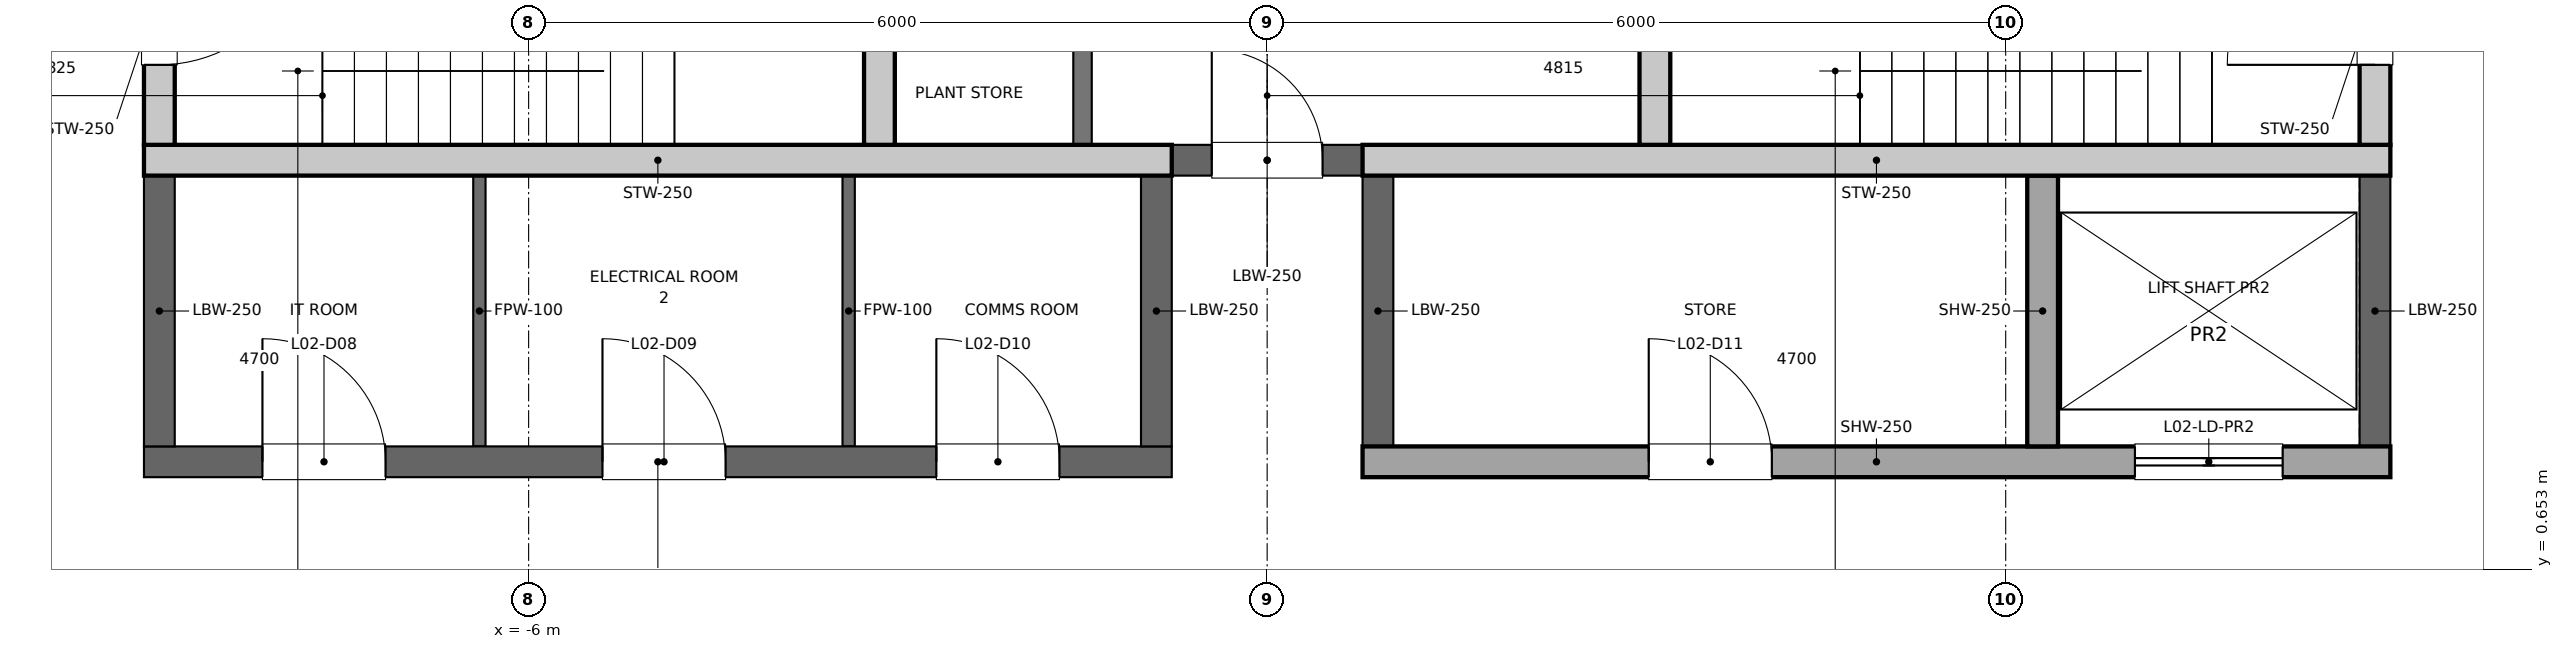
"""IFC4 building model, lengths in metres.
Left out: names, types, materials, properties, quantities, classifications, styles, units other than length and angle.
Written with IfcOpenShell. Run it as: python <this file> out.ifc"""

import sys

from ifc_helpers import new_model, si_unit, direction, frame, frame_2d, origin, place, context, subcontext, project, spatial, rectangle, extrude, element, fill, save


model = new_model("IFC4")
c1 = context("Model", 3, precision=1e-05, world=origin(), true_north=direction((0.0, 1.0)))
c2 = subcontext(c1, "Body", "Model", "MODEL_VIEW")
j1 = project(units=[si_unit("LENGTHUNIT", "METRE"), si_unit("PLANEANGLEUNIT", "RADIAN")], contexts=[c1])
p1 = place(None, origin())
s1 = spatial("IfcSite", under=j1, at=p1, CompositionType="ELEMENT")
p2 = place(p1, origin())
s2 = spatial("IfcBuilding", under=s1, at=p2, CompositionType="ELEMENT")
p3 = place(p2, frame((0.0, 0.0, 17.0)))
s3 = spatial("IfcBuildingStorey", under=s2, at=p3, CompositionType="ELEMENT", Elevation=17.0)
p4 = place(p3, frame((-1.5, 4.1, 0.0), z_axis=(0.0, 0.0, 1.0), x_axis=(0.0, 1.0, 0.0)))
e1 = element("IfcWall", 1, at=p4, inside=s3, PredefinedType="PARTITIONING", context=c2, shape_type="SweptSolid", body=[
    extrude(rectangle(XDim=2.5, YDim=0.15, at=frame_2d((1.25, 0.0))), origin(), (0.0, 0.0, 1.0), 8.8),
])
p5 = place(p4, frame((0.8, 0.0, 0.0)))
e2 = element("IfcOpeningElement", 2, at=p5, cuts=e1, PredefinedType="OPENING", context=c2, shape_type="SweptSolid", body=[
    extrude(rectangle(XDim=0.9, YDim=2.1, at=frame_2d((0.45, 1.05))), frame((0.0, 0.075, 0.0), z_axis=(0.0, -1.0, 0.0), x_axis=(1.0, 0.0, 0.0)), (0.0, 0.0, 1.0), 0.15),
])
p6 = place(p3, frame((-9.0, 4.1, 0.0), z_axis=(0.0, 0.0, 1.0), x_axis=(0.0, 1.0, 0.0)))
e3 = element("IfcWall", 3, at=p6, inside=s3, PredefinedType="SOLIDWALL", context=c2, shape_type="SweptSolid", body=[
    extrude(rectangle(XDim=2.5, YDim=0.25, at=frame_2d((1.25, 0.0))), origin(), (0.0, 0.0, 1.0), 8.8),
])
p7 = place(p6, frame((0.65, 0.0, 0.0)))
e4 = element("IfcOpeningElement", 4, at=p7, cuts=e3, PredefinedType="OPENING", context=c2, shape_type="SweptSolid", body=[
    extrude(rectangle(XDim=1.2, YDim=2.1, at=frame_2d((0.6, 1.05))), frame((0.0, 0.125, 0.0), z_axis=(0.0, -1.0, 0.0), x_axis=(1.0, 0.0, 0.0)), (0.0, 0.0, 1.0), 0.25),
])
p8 = place(p3, frame((9.0, 4.1, 0.0), z_axis=(0.0, 0.0, 1.0), x_axis=(0.0, 1.0, 0.0)))
e5 = element("IfcWall", 5, at=p8, inside=s3, PredefinedType="SOLIDWALL", context=c2, shape_type="SweptSolid", body=[
    extrude(rectangle(XDim=2.5, YDim=0.25, at=frame_2d((1.25, 0.0))), origin(), (0.0, 0.0, 1.0), 8.8),
])
p9 = place(p8, frame((0.65, 0.0, 0.0)))
e6 = element("IfcOpeningElement", 6, at=p9, cuts=e5, PredefinedType="OPENING", context=c2, shape_type="SweptSolid", body=[
    extrude(rectangle(XDim=1.2, YDim=2.1, at=frame_2d((0.6, 1.05))), frame((0.0, 0.125, 0.0), z_axis=(0.0, -1.0, 0.0), x_axis=(1.0, 0.0, 0.0)), (0.0, 0.0, 1.0), 0.25),
])
for number, where, z_axis, x_axis in (
    (7, (-3.15, 4.1, 0.0), (0.0, 0.0, 1.0), (0.0, 1.0, 0.0)),
    (8, (3.15, 4.1, 0.0), (0.0, 0.0, 1.0), (0.0, 1.0, 0.0)),
):
    element("IfcWall", number, at=place(p3, frame(where, z_axis=z_axis, x_axis=x_axis)), inside=s3, PredefinedType="SOLIDWALL", context=c2, shape_type="SweptSolid", body=[
        extrude(rectangle(XDim=2.5, YDim=0.25, at=frame_2d((1.25, 0.0))), origin(), (0.0, 0.0, 1.0), 8.8),
    ])
p10 = place(p3, frame((-0.775, 3.975, 0.0), z_axis=(0.0, 0.0, 1.0), x_axis=(1.0, 0.0, 0.0)))
e9 = element("IfcWall", 9, at=p10, inside=s3, PredefinedType="PARTITIONING", context=c2, shape_type="SweptSolid", body=[
    extrude(rectangle(XDim=1.55, YDim=0.25, at=frame_2d((0.775, 0.0))), origin(), (0.0, 0.0, 1.0), 8.8),
])
p11 = place(p10, frame((0.325, 0.0, 0.0)))
e10 = element("IfcOpeningElement", 10, at=p11, cuts=e9, PredefinedType="OPENING", context=c2, shape_type="SweptSolid", body=[
    extrude(rectangle(XDim=0.9, YDim=2.1, at=frame_2d((0.45, 1.05))), frame((0.0, 0.125, 0.0), z_axis=(0.0, -1.0, 0.0), x_axis=(1.0, 0.0, 0.0)), (0.0, 0.0, 1.0), 0.25),
])
p12 = place(p3, frame((-9.125, 1.525, 0.0), z_axis=(0.0, 0.0, 1.0), x_axis=(1.0, 0.0, 0.0)))
e11 = element("IfcWall", 11, at=p12, inside=s3, PredefinedType="PARTITIONING", context=c2, shape_type="SweptSolid", body=[
    extrude(rectangle(XDim=8.35, YDim=0.25, at=frame_2d((4.175, 0.0))), origin(), (0.0, 0.0, 1.0), 8.8),
])
p13 = place(p12, frame((0.962, 0.0, 0.0)))
e12 = element("IfcOpeningElement", 12, at=p13, cuts=e11, PredefinedType="OPENING", context=c2, shape_type="SweptSolid", body=[
    extrude(rectangle(XDim=1.0, YDim=2.1, at=frame_2d((0.5, 1.05))), frame((0.0, 0.125, 0.0), z_axis=(0.0, -1.0, 0.0), x_axis=(1.0, 0.0, 0.0)), (0.0, 0.0, 1.0), 0.25),
])
p14 = place(p12, frame((3.725, 0.0, 0.0)))
e13 = element("IfcOpeningElement", 13, at=p14, cuts=e11, PredefinedType="OPENING", context=c2, shape_type="SweptSolid", body=[
    extrude(rectangle(XDim=1.0, YDim=2.1, at=frame_2d((0.5, 1.05))), frame((0.0, 0.125, 0.0), z_axis=(0.0, -1.0, 0.0), x_axis=(1.0, 0.0, 0.0)), (0.0, 0.0, 1.0), 0.25),
])
p15 = place(p12, frame((6.438, 0.0, 0.0)))
e14 = element("IfcOpeningElement", 14, at=p15, cuts=e11, PredefinedType="OPENING", context=c2, shape_type="SweptSolid", body=[
    extrude(rectangle(XDim=1.0, YDim=2.1, at=frame_2d((0.5, 1.05))), frame((0.0, 0.125, 0.0), z_axis=(0.0, -1.0, 0.0), x_axis=(1.0, 0.0, 0.0)), (0.0, 0.0, 1.0), 0.25),
])
p16 = place(p3, frame((0.775, 1.525, 0.0), z_axis=(0.0, 0.0, 1.0), x_axis=(1.0, 0.0, 0.0)))
e15 = element("IfcWall", 15, at=p16, inside=s3, PredefinedType="SOLIDWALL", context=c2, shape_type="SweptSolid", body=[
    extrude(rectangle(XDim=8.35, YDim=0.25, at=frame_2d((4.175, 0.0))), origin(), (0.0, 0.0, 1.0), 8.8),
])
p17 = place(p16, frame((6.275, 0.0, 0.0)))
e16 = element("IfcOpeningElement", 16, at=p17, cuts=e15, PredefinedType="OPENING", context=c2, shape_type="SweptSolid", body=[
    extrude(rectangle(XDim=1.2, YDim=2.1, at=frame_2d((0.6, 1.05))), frame((0.0, 0.125, 0.0), z_axis=(0.0, -1.0, 0.0), x_axis=(1.0, 0.0, 0.0)), (0.0, 0.0, 1.0), 0.25),
])
p18 = place(p16, frame((2.325, 0.0, 0.0)))
e17 = element("IfcOpeningElement", 17, at=p18, cuts=e15, PredefinedType="OPENING", context=c2, shape_type="SweptSolid", body=[
    extrude(rectangle(XDim=1.0, YDim=2.1, at=frame_2d((0.5, 1.05))), frame((0.0, 0.125, 0.0), z_axis=(0.0, -1.0, 0.0), x_axis=(1.0, 0.0, 0.0)), (0.0, 0.0, 1.0), 0.25),
])
p19 = place(p3, frame((6.3, 1.65, 0.0), z_axis=(0.0, 0.0, 1.0), x_axis=(0.0, 1.0, 0.0)))
e18 = element("IfcWall", 18, at=p19, inside=s3, PredefinedType="SOLIDWALL", context=c2, shape_type="SweptSolid", body=[
    extrude(rectangle(XDim=2.2, YDim=0.25, at=frame_2d((1.1, 0.0))), origin(), (0.0, 0.0, 1.0), 8.8),
])
for number, where, z_axis, x_axis in (
    (19, (-9.125, 3.975, 0.0), (0.0, 0.0, 1.0), (1.0, 0.0, 0.0)),
    (20, (0.775, 3.975, 0.0), (0.0, 0.0, 1.0), (1.0, 0.0, 0.0)),
):
    element("IfcWall", number, at=place(p3, frame(where, z_axis=z_axis, x_axis=x_axis)), inside=s3, PredefinedType="SOLIDWALL", context=c2, shape_type="SweptSolid", body=[
        extrude(rectangle(XDim=8.35, YDim=0.25, at=frame_2d((4.175, 0.0))), origin(), (0.0, 0.0, 1.0), 8.8),
    ])
for number, where, z_axis, x_axis in (
    (21, (-9.0, 1.65, 0.0), (0.0, 0.0, 1.0), (0.0, 1.0, 0.0)),
    (22, (-0.9, 1.65, 0.0), (0.0, 0.0, 1.0), (0.0, 1.0, 0.0)),
    (23, (9.0, 1.65, 0.0), (0.0, 0.0, 1.0), (0.0, 1.0, 0.0)),
    (24, (0.9, 1.65, 0.0), (0.0, 0.0, 1.0), (0.0, 1.0, 0.0)),
):
    element("IfcWall", number, at=place(p3, frame(where, z_axis=z_axis, x_axis=x_axis)), inside=s3, PredefinedType="PARTITIONING", context=c2, shape_type="SweptSolid", body=[
        extrude(rectangle(XDim=2.2, YDim=0.25, at=frame_2d((1.1, 0.0))), origin(), (0.0, 0.0, 1.0), 8.8),
    ])
for number, where, z_axis, x_axis in (
    (25, (-6.4, 1.65, 0.0), (0.0, 0.0, 1.0), (0.0, 1.0, 0.0)),
    (26, (-3.4, 1.65, 0.0), (0.0, 0.0, 1.0), (0.0, 1.0, 0.0)),
):
    element("IfcWall", number, at=place(p3, frame(where, z_axis=z_axis, x_axis=x_axis)), inside=s3, PredefinedType="PARTITIONING", context=c2, shape_type="SweptSolid", body=[
        extrude(rectangle(XDim=2.2, YDim=0.1, at=frame_2d((1.1, 0.0))), origin(), (0.0, 0.0, 1.0), 8.8),
    ])
p20 = place(p17, origin())
e27 = element("IfcDoor", 27, at=p20, inside=s3, OperationType="DOUBLE_DOOR_SLIDING", PredefinedType="DOOR", context=c2, shape_type="SweptSolid", body=[
    extrude(rectangle(XDim=1.2, YDim=2.1, at=frame_2d((0.6, 1.05))), frame((0.0, 0.025, 0.0), z_axis=(0.0, -1.0, 0.0), x_axis=(1.0, 0.0, 0.0)), (0.0, 0.0, 1.0), 0.05),
])
fill(e16, e27)
p21 = place(p7, origin())
e28 = element("IfcDoor", 28, at=p21, inside=s3, OperationType="SINGLE_SWING_RIGHT", PredefinedType="DOOR", context=c2, shape_type="SweptSolid", body=[
    extrude(rectangle(XDim=1.2, YDim=2.1, at=frame_2d((0.6, 1.05))), frame((0.0, 0.025, 0.0), z_axis=(0.0, -1.0, 0.0), x_axis=(1.0, 0.0, 0.0)), (0.0, 0.0, 1.0), 0.05),
])
fill(e4, e28)
p22 = place(p9, origin())
e29 = element("IfcDoor", 29, at=p22, inside=s3, OperationType="SINGLE_SWING_LEFT", PredefinedType="DOOR", context=c2, shape_type="SweptSolid", body=[
    extrude(rectangle(XDim=1.2, YDim=2.1, at=frame_2d((0.6, 1.05))), frame((0.0, 0.025, 0.0), z_axis=(0.0, -1.0, 0.0), x_axis=(1.0, 0.0, 0.0)), (0.0, 0.0, 1.0), 0.05),
])
fill(e6, e29)
p23 = place(p11, origin())
e30 = element("IfcDoor", 30, at=p23, inside=s3, OperationType="SINGLE_SWING_LEFT", PredefinedType="DOOR", context=c2, shape_type="SweptSolid", body=[
    extrude(rectangle(XDim=0.9, YDim=2.1, at=frame_2d((0.45, 1.05))), frame((0.0, 0.025, 0.0), z_axis=(0.0, -1.0, 0.0), x_axis=(1.0, 0.0, 0.0)), (0.0, 0.0, 1.0), 0.05),
])
fill(e10, e30)
p24 = place(p13, origin())
e31 = element("IfcDoor", 31, at=p24, inside=s3, OperationType="SINGLE_SWING_LEFT", PredefinedType="DOOR", context=c2, shape_type="SweptSolid", body=[
    extrude(rectangle(XDim=1.0, YDim=2.1, at=frame_2d((0.5, 1.05))), frame((0.0, 0.025, 0.0), z_axis=(0.0, -1.0, 0.0), x_axis=(1.0, 0.0, 0.0)), (0.0, 0.0, 1.0), 0.05),
])
fill(e12, e31)
p25 = place(p14, origin())
e32 = element("IfcDoor", 32, at=p25, inside=s3, OperationType="SINGLE_SWING_LEFT", PredefinedType="DOOR", context=c2, shape_type="SweptSolid", body=[
    extrude(rectangle(XDim=1.0, YDim=2.1, at=frame_2d((0.5, 1.05))), frame((0.0, 0.025, 0.0), z_axis=(0.0, -1.0, 0.0), x_axis=(1.0, 0.0, 0.0)), (0.0, 0.0, 1.0), 0.05),
])
fill(e13, e32)
p26 = place(p15, origin())
e33 = element("IfcDoor", 33, at=p26, inside=s3, OperationType="SINGLE_SWING_LEFT", PredefinedType="DOOR", context=c2, shape_type="SweptSolid", body=[
    extrude(rectangle(XDim=1.0, YDim=2.1, at=frame_2d((0.5, 1.05))), frame((0.0, 0.025, 0.0), z_axis=(0.0, -1.0, 0.0), x_axis=(1.0, 0.0, 0.0)), (0.0, 0.0, 1.0), 0.05),
])
fill(e14, e33)
p27 = place(p18, origin())
e34 = element("IfcDoor", 34, at=p27, inside=s3, OperationType="SINGLE_SWING_LEFT", PredefinedType="DOOR", context=c2, shape_type="SweptSolid", body=[
    extrude(rectangle(XDim=1.0, YDim=2.1, at=frame_2d((0.5, 1.05))), frame((0.0, 0.025, 0.0), z_axis=(0.0, -1.0, 0.0), x_axis=(1.0, 0.0, 0.0)), (0.0, 0.0, 1.0), 0.05),
])
fill(e17, e34)
save(model, sys.argv[1])
